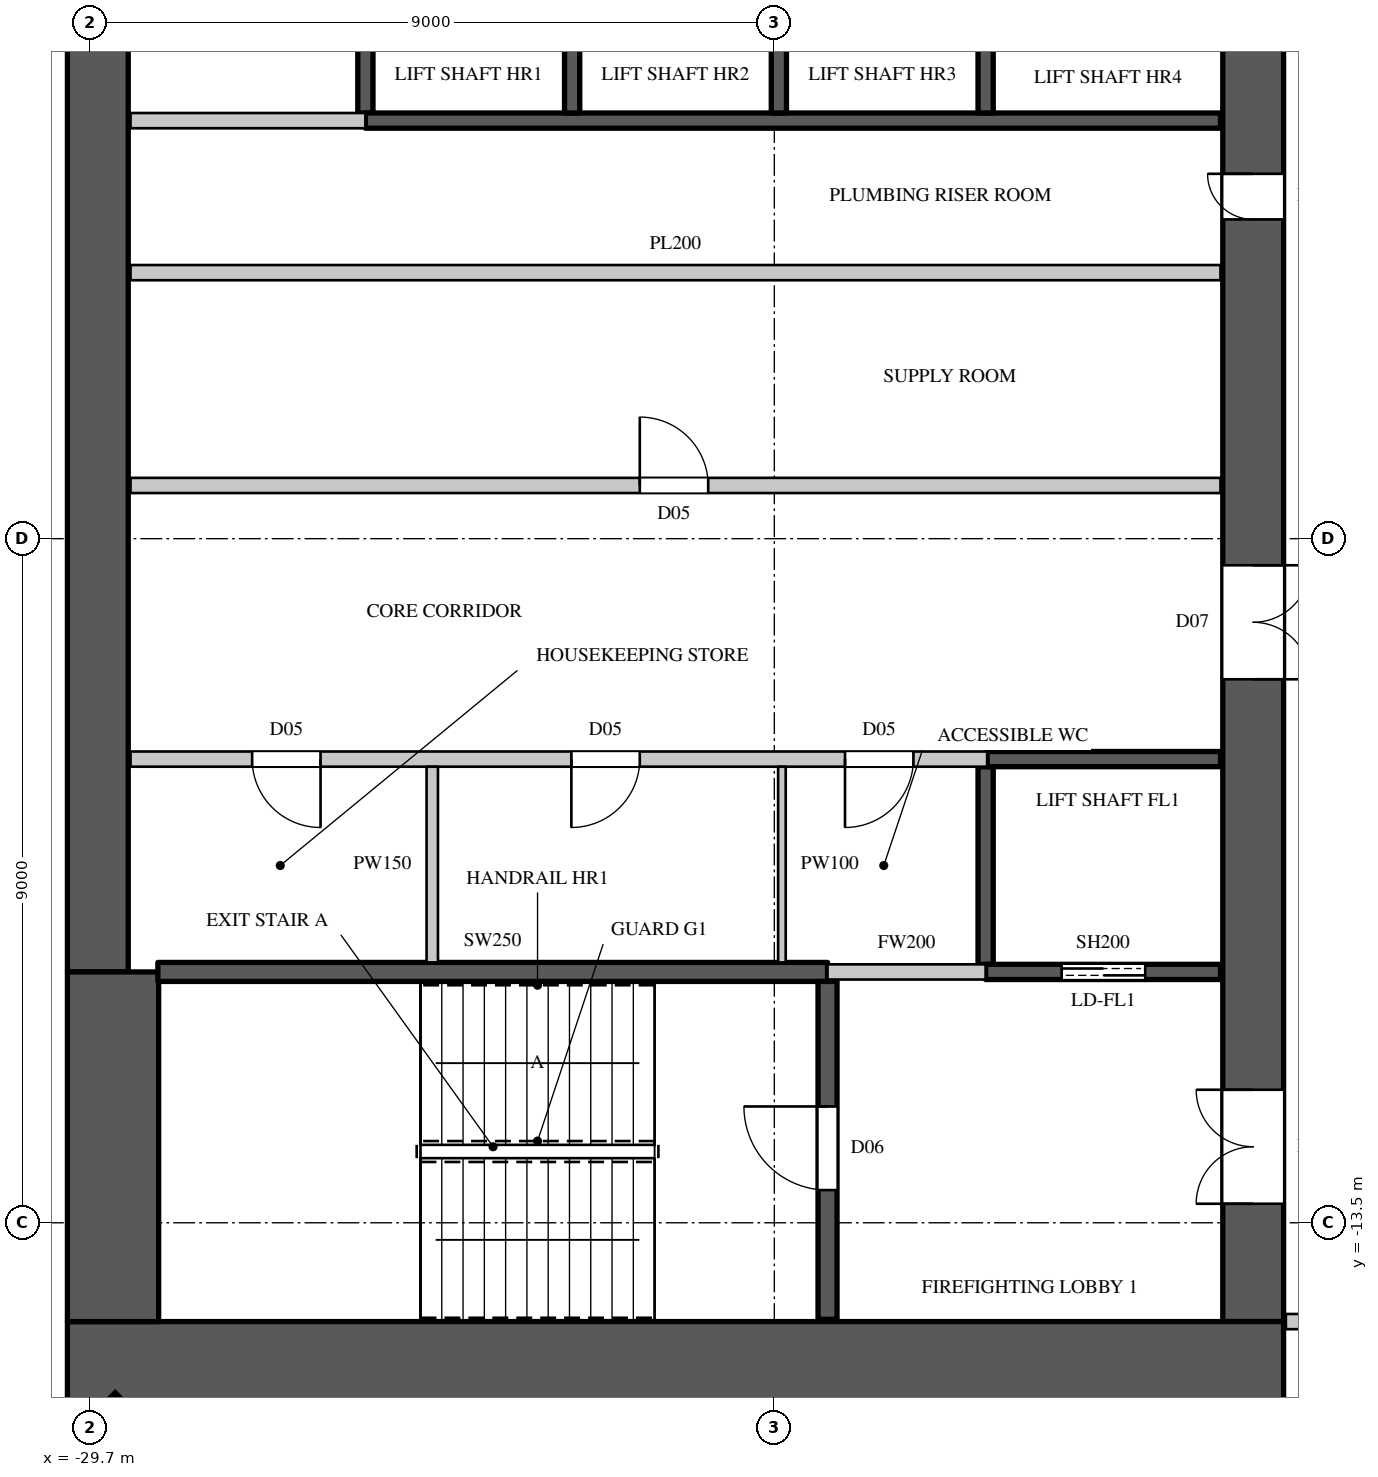
"""IFC4 building model, lengths in metres.
Left out: names, types, materials, properties, quantities, classifications, styles, units other than length and angle.
Written with IfcOpenShell. Run it as: python <this file> out.ifc"""

import sys

from ifc_helpers import new_model, si_unit, direction, frame, frame_2d, origin, origin_2d, place, context, subcontext, project, spatial, rectangle, extrude, element, fill, save


model = new_model("IFC4")
c1 = context("Model", 3, precision=1e-05, world=origin(), true_north=direction((0.0, 1.0)))
c2 = subcontext(c1, "Body", "Model", "MODEL_VIEW")
j1 = project(units=[si_unit("LENGTHUNIT", "METRE"), si_unit("PLANEANGLEUNIT", "RADIAN")], contexts=[c1])
p1 = place(None, origin())
s1 = spatial("IfcSite", under=j1, at=p1, CompositionType="ELEMENT")
p2 = place(p1, origin())
s2 = spatial("IfcBuilding", under=s1, at=p2, CompositionType="ELEMENT")
p3 = place(p2, frame((0.0, 0.0, 222.0)))
s3 = spatial("IfcBuildingStorey", under=s2, at=p3, CompositionType="ELEMENT", Elevation=222.0)
p4 = place(p3, frame((-29.443, -16.443, 0.0), z_axis=(0.0, 0.0, 1.0), x_axis=(0.707106781187, -0.707106781187, 0.0)))
e1 = element("IfcColumn", 1, at=p4, inside=s3, PredefinedType="COLUMN", context=c2, shape_type="SweptSolid", body=[
    extrude(rectangle(XDim=0.9, YDim=1.1, at=origin_2d()), origin(), (0.0, 0.0, 1.0), 4.1),
])
p5 = place(p3, frame((-30.0, -15.4, 0.0), z_axis=(0.0, 0.0, 1.0), x_axis=(1.0, 0.0, 0.0)))
e2 = element("IfcWall", 2, at=p5, inside=s3, PredefinedType="SHEAR", context=c2, shape_type="SweptSolid", body=[
    extrude(rectangle(XDim=16.0, YDim=1.2, at=frame_2d((8.0, 0.0))), origin(), (0.0, 0.0, 1.0), 4.1),
])
p6 = place(p3, frame((-14.4, -14.8, 0.0), z_axis=(0.0, 0.0, 1.0), x_axis=(0.0, 1.0, 0.0)))
e3 = element("IfcWall", 3, at=p6, inside=s3, PredefinedType="SHEAR", context=c2, shape_type="SweptSolid", body=[
    extrude(rectangle(XDim=29.6, YDim=0.8, at=frame_2d((14.8, 0.0))), origin(), (0.0, 0.0, 1.0), 4.1),
])
p7 = place(p6, frame((1.55, 0.0, 0.0)))
e4 = element("IfcOpeningElement", 4, at=p7, cuts=e3, PredefinedType="OPENING", context=c2, shape_type="SweptSolid", body=[
    extrude(rectangle(XDim=1.5, YDim=2.4, at=frame_2d((0.75, 1.2))), frame((0.0, 0.41, 0.0), z_axis=(0.0, -1.0, 0.0), x_axis=(1.0, 0.0, 0.0)), (0.0, 0.0, 1.0), 0.82),
])
p8 = place(p6, frame((26.55, 0.0, 0.0)))
e5 = element("IfcOpeningElement", 5, at=p8, cuts=e3, PredefinedType="OPENING", context=c2, shape_type="SweptSolid", body=[
    extrude(rectangle(XDim=1.5, YDim=2.4, at=frame_2d((0.75, 1.2))), frame((0.0, 0.41, 0.0), z_axis=(0.0, -1.0, 0.0), x_axis=(1.0, 0.0, 0.0)), (0.0, 0.0, 1.0), 0.82),
])
p9 = place(p6, frame((8.45, 0.0, 0.0)))
e6 = element("IfcOpeningElement", 6, at=p9, cuts=e3, PredefinedType="OPENING", context=c2, shape_type="SweptSolid", body=[
    extrude(rectangle(XDim=1.5, YDim=2.4, at=frame_2d((0.75, 1.2))), frame((0.0, 0.41, 0.0), z_axis=(0.0, -1.0, 0.0), x_axis=(1.0, 0.0, 0.0)), (0.0, 0.0, 1.0), 0.82),
])
p10 = place(p6, frame((19.65, 0.0, 0.0)))
e7 = element("IfcOpeningElement", 7, at=p10, cuts=e3, PredefinedType="OPENING", context=c2, shape_type="SweptSolid", body=[
    extrude(rectangle(XDim=1.5, YDim=2.4, at=frame_2d((0.75, 1.2))), frame((0.0, 0.41, 0.0), z_axis=(0.0, -1.0, 0.0), x_axis=(1.0, 0.0, 0.0)), (0.0, 0.0, 1.0), 0.82),
])
p11 = place(p6, frame((14.5, 0.0, 0.0)))
e8 = element("IfcOpeningElement", 8, at=p11, cuts=e3, PredefinedType="OPENING", context=c2, shape_type="SweptSolid", body=[
    extrude(rectangle(XDim=0.6, YDim=2.0, at=frame_2d((0.3, 1.0))), frame((0.0, 0.41, 0.0), z_axis=(0.0, -1.0, 0.0), x_axis=(1.0, 0.0, 0.0)), (0.0, 0.0, 1.0), 0.82),
])
p12 = place(p3, frame((-29.6, -10.2, 0.0), z_axis=(0.0, 0.0, 1.0), x_axis=(0.0, 1.0, 0.0)))
e9 = element("IfcWall", 9, at=p12, inside=s3, PredefinedType="SHEAR", context=c2, shape_type="SweptSolid", body=[
    extrude(rectangle(XDim=20.4, YDim=0.8, at=frame_2d((10.2, 0.0))), origin(), (0.0, 0.0, 1.0), 4.1),
])
p13 = place(p3, frame((-29.4, -14.8, 0.0), z_axis=(0.0, 0.0, 1.0), x_axis=(0.0, 1.0, 0.0)))
e10 = element("IfcWall", 10, at=p13, inside=s3, PredefinedType="SHEAR", context=c2, shape_type="SweptSolid", body=[
    extrude(rectangle(XDim=4.6, YDim=1.2, at=frame_2d((2.3, 0.0))), origin(), (0.0, 0.0, 1.0), 4.1),
])
p14 = place(p3, frame((-29.17, -7.4, 0.0), z_axis=(0.0, 0.0, 1.0), x_axis=(1.0, 0.0, 0.0)))
e11 = element("IfcWall", 11, at=p14, inside=s3, PredefinedType="PARTITIONING", context=c2, shape_type="SweptSolid", body=[
    extrude(rectangle(XDim=11.27, YDim=0.2, at=frame_2d((5.635, 0.0))), origin(), (0.0, 0.0, 1.0), 3.8),
])
p15 = place(p14, frame((1.6, 0.0, 0.0)))
e12 = element("IfcOpeningElement", 12, at=p15, cuts=e11, PredefinedType="OPENING", context=c2, shape_type="SweptSolid", body=[
    extrude(rectangle(XDim=0.9, YDim=2.2, at=frame_2d((0.45, 1.1))), frame((0.0, 0.11, 0.0), z_axis=(0.0, -1.0, 0.0), x_axis=(1.0, 0.0, 0.0)), (0.0, 0.0, 1.0), 0.22),
])
p16 = place(p14, frame((5.8, 0.0, 0.0)))
e13 = element("IfcOpeningElement", 13, at=p16, cuts=e11, PredefinedType="OPENING", context=c2, shape_type="SweptSolid", body=[
    extrude(rectangle(XDim=0.9, YDim=2.2, at=frame_2d((0.45, 1.1))), frame((0.0, 0.11, 0.0), z_axis=(0.0, -1.0, 0.0), x_axis=(1.0, 0.0, 0.0)), (0.0, 0.0, 1.0), 0.22),
])
p17 = place(p14, frame((9.4, 0.0, 0.0)))
e14 = element("IfcOpeningElement", 14, at=p17, cuts=e11, PredefinedType="OPENING", context=c2, shape_type="SweptSolid", body=[
    extrude(rectangle(XDim=0.9, YDim=2.2, at=frame_2d((0.45, 1.1))), frame((0.0, 0.11, 0.0), z_axis=(0.0, -1.0, 0.0), x_axis=(1.0, 0.0, 0.0)), (0.0, 0.0, 1.0), 0.22),
])
p18 = place(p3, frame((-29.17, -3.8, 0.0), z_axis=(0.0, 0.0, 1.0), x_axis=(1.0, 0.0, 0.0)))
e15 = element("IfcWall", 15, at=p18, inside=s3, PredefinedType="PARTITIONING", context=c2, shape_type="SweptSolid", body=[
    extrude(rectangle(XDim=14.34, YDim=0.2, at=frame_2d((7.17, 0.0))), origin(), (0.0, 0.0, 1.0), 3.8),
])
p19 = place(p18, frame((6.7, 0.0, 0.0)))
e16 = element("IfcOpeningElement", 16, at=p19, cuts=e15, PredefinedType="OPENING", context=c2, shape_type="SweptSolid", body=[
    extrude(rectangle(XDim=0.9, YDim=2.2, at=frame_2d((0.45, 1.1))), frame((0.0, 0.11, 0.0), z_axis=(0.0, -1.0, 0.0), x_axis=(1.0, 0.0, 0.0)), (0.0, 0.0, 1.0), 0.22),
])
p20 = place(p3, frame((-20.0, -10.2, 0.0), z_axis=(0.0, 0.0, 1.0), x_axis=(1.0, 0.0, 0.0)))
e17 = element("IfcWall", 17, at=p20, inside=s3, PredefinedType="PARTITIONING", context=c2, shape_type="SweptSolid", body=[
    extrude(rectangle(XDim=2.08, YDim=0.2, at=frame_2d((1.04, 0.0))), origin(), (0.0, 0.0, 1.0), 3.8),
])
p21 = place(p3, frame((-13.97, -14.8, 0.0), z_axis=(0.0, 0.0, 1.0), x_axis=(1.0, 0.0, 0.0)))
e18 = element("IfcWall", 18, at=p21, inside=s3, PredefinedType="PARTITIONING", context=c2, shape_type="SweptSolid", body=[
    extrude(rectangle(XDim=2.87, YDim=0.2, at=frame_2d((1.435, 0.0))), origin(), (0.0, 0.0, 1.0), 3.8),
])
p22 = place(p3, frame((-25.2, -10.075, 0.0), z_axis=(0.0, 0.0, 1.0), x_axis=(0.0, 1.0, 0.0)))
e19 = element("IfcWall", 19, at=p22, inside=s3, PredefinedType="PARTITIONING", context=c2, shape_type="SweptSolid", body=[
    extrude(rectangle(XDim=2.575, YDim=0.15, at=frame_2d((1.288, 0.0))), origin(), (0.0, 0.0, 1.0), 3.8),
])
p23 = place(p3, frame((-29.17, -1.0, 0.0), z_axis=(0.0, 0.0, 1.0), x_axis=(1.0, 0.0, 0.0)))
e20 = element("IfcWall", 20, at=p23, inside=s3, PredefinedType="PARTITIONING", context=c2, shape_type="SweptSolid", body=[
    extrude(rectangle(XDim=14.34, YDim=0.2, at=frame_2d((7.17, 0.0))), origin(), (0.0, 0.0, 1.0), 3.8),
])
p24 = place(p3, frame((-29.17, 1.0, 0.0), z_axis=(0.0, 0.0, 1.0), x_axis=(1.0, 0.0, 0.0)))
e21 = element("IfcWall", 21, at=p24, inside=s3, PredefinedType="PARTITIONING", context=c2, shape_type="SweptSolid", body=[
    extrude(rectangle(XDim=3.09, YDim=0.2, at=frame_2d((1.545, 0.0))), origin(), (0.0, 0.0, 1.0), 3.8),
])
p25 = place(p3, frame((-26.08, 1.1, 0.0), z_axis=(0.0, 0.0, 1.0), x_axis=(0.0, 1.0, 0.0)))
e22 = element("IfcWall", 22, at=p25, inside=s3, PredefinedType="SHEAR", context=c2, shape_type="SweptSolid", body=[
    extrude(rectangle(XDim=2.6, YDim=0.2, at=frame_2d((1.3, 0.0))), origin(), (0.0, 0.0, 1.0), 3.8),
])
p26 = place(p3, frame((-26.08, 1.0, 0.0), z_axis=(0.0, 0.0, 1.0), x_axis=(1.0, 0.0, 0.0)))
e23 = element("IfcWall", 23, at=p26, inside=s3, PredefinedType="SHEAR", context=c2, shape_type="SweptSolid", body=[
    extrude(rectangle(XDim=11.25, YDim=0.2, at=frame_2d((5.625, 0.0))), origin(), (0.0, 0.0, 1.0), 3.8),
])
for number, where, z_axis, x_axis in (
    (24, (-23.36, 1.1, 0.0), (0.0, 0.0, 1.0), (0.0, 1.0, 0.0)),
    (25, (-20.64, 1.1, 0.0), (0.0, 0.0, 1.0), (0.0, 1.0, 0.0)),
):
    element("IfcWall", number, at=place(p3, frame(where, z_axis=z_axis, x_axis=x_axis)), inside=s3, PredefinedType="SHEAR", context=c2, shape_type="SweptSolid", body=[
        extrude(rectangle(XDim=2.6, YDim=0.2, at=frame_2d((1.3, 0.0))), origin(), (0.0, 0.0, 1.0), 4.1),
    ])
p27 = place(p3, frame((-17.92, -10.1, 0.0), z_axis=(0.0, 0.0, 1.0), x_axis=(0.0, 1.0, 0.0)))
e26 = element("IfcWall", 26, at=p27, inside=s3, PredefinedType="SHEAR", context=c2, shape_type="SweptSolid", body=[
    extrude(rectangle(XDim=2.6, YDim=0.2, at=frame_2d((1.3, 0.0))), origin(), (0.0, 0.0, 1.0), 3.8),
])
p28 = place(p3, frame((-17.92, -10.2, 0.0), z_axis=(0.0, 0.0, 1.0), x_axis=(1.0, 0.0, 0.0)))
e27 = element("IfcWall", 27, at=p28, inside=s3, PredefinedType="SHEAR", context=c2, shape_type="SweptSolid", body=[
    extrude(rectangle(XDim=3.09, YDim=0.2, at=frame_2d((1.545, 0.0))), origin(), (0.0, 0.0, 1.0), 3.8),
])
p29 = place(p28, frame((1.0, 0.0, 0.0)))
e28 = element("IfcOpeningElement", 28, at=p29, cuts=e27, PredefinedType="OPENING", context=c2, shape_type="SweptSolid", body=[
    extrude(rectangle(XDim=1.1, YDim=2.2, at=frame_2d((0.55, 1.1))), frame((0.0, 0.11, 0.0), z_axis=(0.0, -1.0, 0.0), x_axis=(1.0, 0.0, 0.0)), (0.0, 0.0, 1.0), 0.22),
])
p30 = place(p3, frame((-17.9, -7.4, 0.0), z_axis=(0.0, 0.0, 1.0), x_axis=(1.0, 0.0, 0.0)))
e29 = element("IfcWall", 29, at=p30, inside=s3, PredefinedType="SHEAR", context=c2, shape_type="SweptSolid", body=[
    extrude(rectangle(XDim=3.07, YDim=0.2, at=frame_2d((1.535, 0.0))), origin(), (0.0, 0.0, 1.0), 3.8),
])
p31 = place(p3, frame((-17.92, 1.1, 0.0), z_axis=(0.0, 0.0, 1.0), x_axis=(0.0, 1.0, 0.0)))
e30 = element("IfcWall", 30, at=p31, inside=s3, PredefinedType="SHEAR", context=c2, shape_type="SweptSolid", body=[
    extrude(rectangle(XDim=2.6, YDim=0.2, at=frame_2d((1.3, 0.0))), origin(), (0.0, 0.0, 1.0), 4.1),
])
p32 = place(p3, frame((-28.81, -10.2, 0.0), z_axis=(0.0, 0.0, 1.0), x_axis=(1.0, 0.0, 0.0)))
e31 = element("IfcWall", 31, at=p32, inside=s3, PredefinedType="SHEAR", context=c2, shape_type="SweptSolid", body=[
    extrude(rectangle(XDim=8.81, YDim=0.25, at=frame_2d((4.405, 0.0))), origin(), (0.0, 0.0, 1.0), 3.8),
])
p33 = place(p3, frame((-20.0, -14.77, 0.0), z_axis=(0.0, 0.0, 1.0), x_axis=(0.0, 1.0, 0.0)))
e32 = element("IfcWall", 32, at=p33, inside=s3, PredefinedType="SHEAR", context=c2, shape_type="SweptSolid", body=[
    extrude(rectangle(XDim=4.445, YDim=0.25, at=frame_2d((2.223, 0.0))), origin(), (0.0, 0.0, 1.0), 3.8),
])
p34 = place(p33, frame((1.7, 0.0, 0.0)))
e33 = element("IfcOpeningElement", 33, at=p34, cuts=e32, PredefinedType="OPENING", context=c2, shape_type="SweptSolid", body=[
    extrude(rectangle(XDim=1.1, YDim=2.2, at=frame_2d((0.55, 1.1))), frame((0.0, 0.135, 0.0), z_axis=(0.0, -1.0, 0.0), x_axis=(1.0, 0.0, 0.0)), (0.0, 0.0, 1.0), 0.27),
])
p35 = place(p3, frame((-20.6, -10.075, 0.0), z_axis=(0.0, 0.0, 1.0), x_axis=(0.0, 1.0, 0.0)))
e34 = element("IfcWall", 34, at=p35, inside=s3, PredefinedType="PARTITIONING", context=c2, shape_type="SweptSolid", body=[
    extrude(rectangle(XDim=2.575, YDim=0.1, at=frame_2d((1.288, 0.0))), origin(), (0.0, 0.0, 1.0), 3.8),
])
p36 = place(p34, origin())
e35 = element("IfcDoor", 35, at=p36, inside=s3, OperationType="SINGLE_SWING_RIGHT", PredefinedType="DOOR", context=c2, shape_type="SweptSolid", body=[
    extrude(rectangle(XDim=1.1, YDim=2.2, at=frame_2d((0.55, 1.1))), frame((0.0, 0.025, 0.0), z_axis=(0.0, -1.0, 0.0), x_axis=(1.0, 0.0, 0.0)), (0.0, 0.0, 1.0), 0.05),
])
fill(e33, e35)
p37 = place(p15, origin())
e36 = element("IfcDoor", 36, at=p37, inside=s3, OperationType="SINGLE_SWING_LEFT", PredefinedType="DOOR", context=c2, shape_type="SweptSolid", body=[
    extrude(rectangle(XDim=0.9, YDim=2.2, at=frame_2d((0.45, 1.1))), frame((0.0, 0.025, 0.0), z_axis=(0.0, -1.0, 0.0), x_axis=(1.0, 0.0, 0.0)), (0.0, 0.0, 1.0), 0.05),
])
fill(e12, e36)
p38 = place(p16, origin())
e37 = element("IfcDoor", 37, at=p38, inside=s3, OperationType="SINGLE_SWING_RIGHT", PredefinedType="DOOR", context=c2, shape_type="SweptSolid", body=[
    extrude(rectangle(XDim=0.9, YDim=2.2, at=frame_2d((0.45, 1.1))), frame((0.0, 0.025, 0.0), z_axis=(0.0, -1.0, 0.0), x_axis=(1.0, 0.0, 0.0)), (0.0, 0.0, 1.0), 0.05),
])
fill(e13, e37)
p39 = place(p17, origin())
e38 = element("IfcDoor", 38, at=p39, inside=s3, OperationType="SINGLE_SWING_RIGHT", PredefinedType="DOOR", context=c2, shape_type="SweptSolid", body=[
    extrude(rectangle(XDim=0.9, YDim=2.2, at=frame_2d((0.45, 1.1))), frame((0.0, 0.025, 0.0), z_axis=(0.0, -1.0, 0.0), x_axis=(1.0, 0.0, 0.0)), (0.0, 0.0, 1.0), 0.05),
])
fill(e14, e38)
p40 = place(p19, origin())
e39 = element("IfcDoor", 39, at=p40, inside=s3, OperationType="SINGLE_SWING_LEFT", PredefinedType="DOOR", context=c2, shape_type="SweptSolid", body=[
    extrude(rectangle(XDim=0.9, YDim=2.2, at=frame_2d((0.45, 1.1))), frame((0.0, 0.025, 0.0), z_axis=(0.0, -1.0, 0.0), x_axis=(1.0, 0.0, 0.0)), (0.0, 0.0, 1.0), 0.05),
])
fill(e16, e39)
p41 = place(p29, origin())
e40 = element("IfcDoor", 40, at=p41, inside=s3, OperationType="DOUBLE_DOOR_SLIDING", PredefinedType="DOOR", context=c2, shape_type="SweptSolid", body=[
    extrude(rectangle(XDim=1.1, YDim=2.2, at=frame_2d((0.55, 1.1))), frame((0.0, 0.025, 0.0), z_axis=(0.0, -1.0, 0.0), x_axis=(1.0, 0.0, 0.0)), (0.0, 0.0, 1.0), 0.05),
])
fill(e28, e40)
p42 = place(p7, origin())
e41 = element("IfcDoor", 41, at=p42, inside=s3, OperationType="DOUBLE_DOOR_SINGLE_SWING", PredefinedType="DOOR", context=c2, shape_type="SweptSolid", body=[
    extrude(rectangle(XDim=1.5, YDim=2.4, at=frame_2d((0.75, 1.2))), frame((0.0, 0.395, 0.0), z_axis=(0.0, -1.0, 0.0), x_axis=(1.0, 0.0, 0.0)), (0.0, 0.0, 1.0), 0.05),
])
fill(e4, e41)
p43 = place(p9, origin())
e42 = element("IfcDoor", 42, at=p43, inside=s3, OperationType="DOUBLE_DOOR_SINGLE_SWING", PredefinedType="DOOR", context=c2, shape_type="SweptSolid", body=[
    extrude(rectangle(XDim=1.5, YDim=2.4, at=frame_2d((0.75, 1.2))), frame((0.0, -0.345, 0.0), z_axis=(0.0, -1.0, 0.0), x_axis=(1.0, 0.0, 0.0)), (0.0, 0.0, 1.0), 0.05),
])
fill(e6, e42)
p44 = place(p11, origin())
e43 = element("IfcDoor", 43, at=p44, inside=s3, OperationType="SINGLE_SWING_RIGHT", PredefinedType="DOOR", context=c2, shape_type="SweptSolid", body=[
    extrude(rectangle(XDim=0.6, YDim=2.0, at=frame_2d((0.3, 1.0))), frame((0.0, 0.395, 0.0), z_axis=(0.0, -1.0, 0.0), x_axis=(1.0, 0.0, 0.0)), (0.0, 0.0, 1.0), 0.05),
])
fill(e8, e43)
save(model, sys.argv[1])
